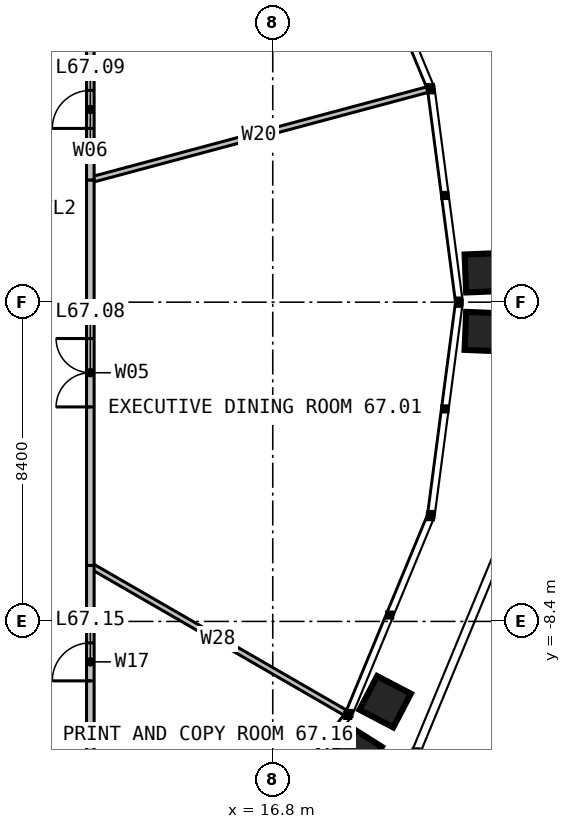
"""IFC4 building model, lengths in metres.
Left out: names, types, materials, properties, quantities, classifications, styles, units other than length and angle.
Written with IfcOpenShell. Run it as: python <this file> out.ifc"""

import sys

from ifc_helpers import new_model, si_unit, direction, frame, frame_2d, origin, place, context, subcontext, project, spatial, rectangle, extrude, element, fill, save


model = new_model("IFC4")
c1 = context("Model", 3, precision=1e-05, world=origin(), true_north=direction((0.0, 1.0)))
c2 = subcontext(c1, "Body", "Model", "MODEL_VIEW")
j1 = project(units=[si_unit("LENGTHUNIT", "METRE"), si_unit("PLANEANGLEUNIT", "RADIAN")], contexts=[c1])
p1 = place(None, origin())
s1 = spatial("IfcSite", under=j1, at=p1, CompositionType="ELEMENT")
p2 = place(p1, origin())
s2 = spatial("IfcBuilding", under=s1, at=p2, CompositionType="ELEMENT")
p3 = place(p2, frame((0.0, 0.0, 276.0)))
s3 = spatial("IfcBuildingStorey", under=s2, at=p3, CompositionType="ELEMENT", Elevation=276.0)
p4 = place(p3, frame((12.0, -6.928, 0.0), z_axis=(0.0, 0.0, 1.0), x_axis=(0.866025099701, -0.500000526688, 0.0)))
e1 = element("IfcWall", 1, at=p4, inside=s3, PredefinedType="PARTITIONING", context=c2, shape_type="SweptSolid", body=[
    extrude(rectangle(XDim=7.752, YDim=0.15, at=frame_2d((3.876, 0.0))), origin(), (0.0, 0.0, 1.0), 2.79),
])
p5 = place(p3, frame((12.0, 3.215, 0.0), z_axis=(0.0, 0.0, 1.0), x_axis=(0.965925864192, 0.258818903647, 0.0)))
e2 = element("IfcWall", 2, at=p5, inside=s3, PredefinedType="PARTITIONING", context=c2, shape_type="SweptSolid", body=[
    extrude(rectangle(XDim=9.185, YDim=0.15, at=frame_2d((4.592, 0.0))), origin(), (0.0, 0.0, 1.0), 2.79),
])
p6 = place(p3, frame((12.0, -6.928, 0.0), z_axis=(0.0, 0.0, 1.0), x_axis=(0.0, 1.0, 0.0)))
e3 = element("IfcWall", 3, at=p6, inside=s3, PredefinedType="PARTITIONING", context=c2, shape_type="SweptSolid", body=[
    extrude(rectangle(XDim=10.144, YDim=0.2, at=frame_2d((5.072, 0.0))), origin(), (0.0, 0.0, 1.0), 3.8),
])
p7 = place(p6, frame((4.172, 0.0, 0.0)))
e4 = element("IfcOpeningElement", 4, at=p7, cuts=e3, PredefinedType="OPENING", context=c2, shape_type="SweptSolid", body=[
    extrude(rectangle(XDim=1.8, YDim=2.2, at=frame_2d((0.9, 1.1))), frame((0.0, 0.11, 0.0), z_axis=(0.0, -1.0, 0.0), x_axis=(1.0, 0.0, 0.0)), (0.0, 0.0, 1.0), 0.22),
])
p8 = place(p3, frame((12.0, 3.215, 0.0), z_axis=(0.0, 0.0, 1.0), x_axis=(0.0, 1.0, 0.0)))
e5 = element("IfcWall", 5, at=p8, inside=s3, PredefinedType="PARTITIONING", context=c2, shape_type="SweptSolid", body=[
    extrude(rectangle(XDim=3.713, YDim=0.2, at=frame_2d((1.856, 0.0))), origin(), (0.0, 0.0, 1.0), 3.8),
])
p9 = place(p8, frame((1.356, 0.0, 0.0)))
e6 = element("IfcOpeningElement", 6, at=p9, cuts=e5, PredefinedType="OPENING", context=c2, shape_type="SweptSolid", body=[
    extrude(rectangle(XDim=1.0, YDim=2.2, at=frame_2d((0.5, 1.1))), frame((0.0, 0.11, 0.0), z_axis=(0.0, -1.0, 0.0), x_axis=(1.0, 0.0, 0.0)), (0.0, 0.0, 1.0), 0.22),
])
p10 = place(p3, frame((12.0, -12.0, 0.0), z_axis=(0.0, 0.0, 1.0), x_axis=(0.0, 1.0, 0.0)))
e7 = element("IfcWall", 7, at=p10, inside=s3, PredefinedType="PARTITIONING", context=c2, shape_type="SweptSolid", body=[
    extrude(rectangle(XDim=5.072, YDim=0.2, at=frame_2d((2.536, 0.0))), origin(), (0.0, 0.0, 1.0), 3.8),
])
p11 = place(p10, frame((2.036, 0.0, 0.0)))
e8 = element("IfcOpeningElement", 8, at=p11, cuts=e7, PredefinedType="OPENING", context=c2, shape_type="SweptSolid", body=[
    extrude(rectangle(XDim=1.0, YDim=2.2, at=frame_2d((0.5, 1.1))), frame((0.0, 0.11, 0.0), z_axis=(0.0, -1.0, 0.0), x_axis=(1.0, 0.0, 0.0)), (0.0, 0.0, 1.0), 0.22),
])
p12 = place(p7, origin())
e9 = element("IfcDoor", 9, at=p12, inside=s3, OperationType="DOUBLE_DOOR_SINGLE_SWING", PredefinedType="DOOR", context=c2, shape_type="SweptSolid", body=[
    extrude(rectangle(XDim=1.8, YDim=2.2, at=frame_2d((0.9, 1.1))), frame((0.0, 0.025, 0.0), z_axis=(0.0, -1.0, 0.0), x_axis=(1.0, 0.0, 0.0)), (0.0, 0.0, 1.0), 0.05),
])
fill(e4, e9)
p13 = place(p9, origin())
e10 = element("IfcDoor", 10, at=p13, inside=s3, OperationType="SINGLE_SWING_LEFT", PredefinedType="DOOR", context=c2, shape_type="SweptSolid", body=[
    extrude(rectangle(XDim=1.0, YDim=2.2, at=frame_2d((0.5, 1.1))), frame((0.0, 0.025, 0.0), z_axis=(0.0, -1.0, 0.0), x_axis=(1.0, 0.0, 0.0)), (0.0, 0.0, 1.0), 0.05),
])
fill(e6, e10)
p14 = place(p11, origin())
e11 = element("IfcDoor", 11, at=p14, inside=s3, OperationType="SINGLE_SWING_LEFT", PredefinedType="DOOR", context=c2, shape_type="SweptSolid", body=[
    extrude(rectangle(XDim=1.0, YDim=2.2, at=frame_2d((0.5, 1.1))), frame((0.0, 0.025, 0.0), z_axis=(0.0, -1.0, 0.0), x_axis=(1.0, 0.0, 0.0)), (0.0, 0.0, 1.0), 0.05),
])
fill(e8, e11)
save(model, sys.argv[1])
